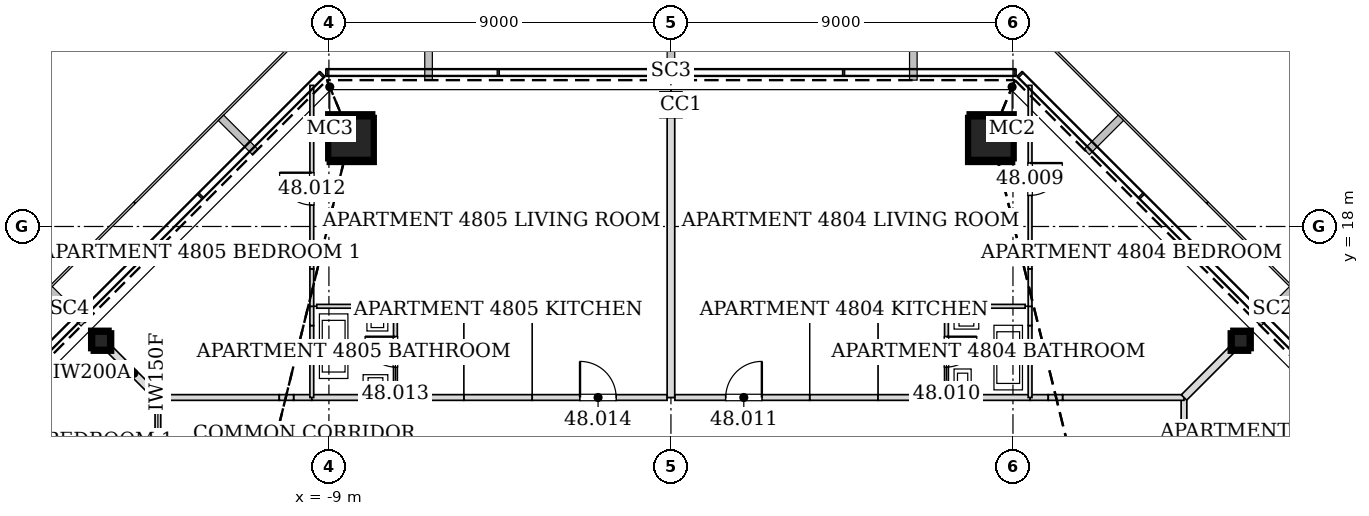
"""IFC4 building model, lengths in metres.
Left out: names, types, materials, properties, quantities, classifications, styles, units other than length and angle.
Written with IfcOpenShell. Run it as: python <this file> out.ifc"""

import sys

from ifc_helpers import new_model, si_unit, direction, frame, frame_2d, origin, origin_2d, place, context, subcontext, project, spatial, rectangle, hollow_rectangle, extrude, element, fill, save


model = new_model("IFC4")
c1 = context("Model", 3, precision=1e-05, world=origin(), true_north=direction((0.0, 1.0)))
c2 = subcontext(c1, "Body", "Model", "MODEL_VIEW")
j1 = project(units=[si_unit("LENGTHUNIT", "METRE"), si_unit("PLANEANGLEUNIT", "RADIAN")], contexts=[c1])
p1 = place(None, origin())
s1 = spatial("IfcSite", under=j1, at=p1, CompositionType="ELEMENT")
p2 = place(p1, origin())
s2 = spatial("IfcBuilding", under=s1, at=p2, CompositionType="ELEMENT")
p3 = place(p2, frame((0.0, 0.0, 210.8)))
s3 = spatial("IfcBuildingStorey", under=s2, at=p3, CompositionType="ELEMENT", Elevation=210.8)
for number, where, z_axis, x_axis in (
    (1, (8.439, 20.373, 0.0), (-0.012, -0.028, 1.0), (0.924, -0.382, 0.0)),
    (2, (-8.439, 20.373, 0.0), (0.012, -0.028, 1.0), (0.924, 0.382, 0.0)),
):
    element("IfcColumn", number, at=place(p3, frame(where, z_axis=z_axis, x_axis=x_axis)), inside=s3, PredefinedType="COLUMN", context=c2, shape_type="SweptSolid", body=[
        extrude(hollow_rectangle(XDim=1.2, YDim=1.2, WallThickness=0.055, at=origin_2d()), origin(), (0.0, 0.0, 1.0), 3.402),
    ])
for number, where, z_axis, x_axis in (
    (3, (15.027, 15.027, 0.0), (-0.02, -0.02, 1.0), (0.707, -0.707, 0.0)),
    (4, (0.0, 21.251, 0.0), (0.0, -0.028, 1.0), (1.0, 0.0, 0.0)),
    (5, (-15.027, 15.027, 0.0), (0.02, -0.02, 1.0), (0.707, 0.707, 0.0)),
):
    element("IfcColumn", number, at=place(p3, frame(where, z_axis=z_axis, x_axis=x_axis)), inside=s3, PredefinedType="COLUMN", context=c2, shape_type="SweptSolid", body=[
        extrude(hollow_rectangle(XDim=0.5, YDim=0.5, WallThickness=0.025, at=origin_2d()), origin(), (0.0, 0.0, 1.0), 3.401),
    ])
for number, where, z_axis, x_axis in (
    (6, (13.5, 10.305, 0.0), (0.0, 0.0, 1.0), (0.0, 1.0, 0.0)),
    (7, (13.5, 13.5, 0.0), (0.0, 0.0, 1.0), (-1.0, 0.0, 0.0)),
):
    element("IfcWall", number, at=place(p3, frame(where, z_axis=z_axis, x_axis=x_axis)), inside=s3, PredefinedType="PARTITIONING", context=c2, shape_type="SweptSolid", body=[
        extrude(rectangle(XDim=3.195, YDim=0.15, at=frame_2d((1.597, 0.0))), origin(), (0.0, 0.0, 1.0), 2.512),
    ])
p4 = place(p3, frame((9.929, 13.5, 0.0), z_axis=(0.0, 0.0, 1.0), x_axis=(-1.0, 0.0, 0.0)))
e8 = element("IfcWall", 8, at=p4, inside=s3, PredefinedType="PARTITIONING", context=c2, shape_type="SweptSolid", body=[
    extrude(rectangle(XDim=0.48, YDim=0.15, at=frame_2d((0.24, 0.0))), origin(), (0.0, 0.0, 1.0), 2.591),
])
p5 = place(p3, frame((10.305, 13.5, 0.0), z_axis=(0.0, 0.0, 1.0), x_axis=(-1.0, 0.0, 0.0)))
e9 = element("IfcWall", 9, at=p5, inside=s3, PredefinedType="PARTITIONING", context=c2, shape_type="SweptSolid", body=[
    extrude(rectangle(XDim=0.376, YDim=0.15, at=frame_2d((0.188, 0.0))), origin(), (0.0, 0.0, 1.0), 2.268),
])
p6 = place(p3, frame((9.451, 13.5, 0.0), z_axis=(0.0, 0.0, 1.0), x_axis=(-1.0, 0.0, 0.0)))
e10 = element("IfcWall", 10, at=p6, inside=s3, PredefinedType="PARTITIONING", context=c2, shape_type="SweptSolid", body=[
    extrude(rectangle(XDim=2.202, YDim=0.15, at=frame_2d((1.101, 0.0))), origin(), (0.0, 0.0, 1.0), 2.591),
])
p7 = place(p3, frame((5.451, 13.5, 0.0), z_axis=(0.0, 0.0, 1.0), x_axis=(-1.0, 0.0, 0.0)))
e11 = element("IfcWall", 11, at=p7, inside=s3, PredefinedType="PARTITIONING", context=c2, shape_type="SweptSolid", body=[
    extrude(rectangle(XDim=1.802, YDim=0.15, at=frame_2d((0.901, 0.0))), origin(), (0.0, 0.0, 1.0), 2.591),
])
p8 = place(p3, frame((3.651, 13.5, 0.0), z_axis=(0.0, 0.0, 1.0), x_axis=(-1.0, 0.0, 0.0)))
e12 = element("IfcWall", 12, at=p8, inside=s3, PredefinedType="PARTITIONING", context=c2, shape_type="SweptSolid", body=[
    extrude(rectangle(XDim=3.549, YDim=0.15, at=frame_2d((1.774, 0.0))), origin(), (0.0, 0.0, 1.0), 2.591),
])
p9 = place(p8, frame((1.259, 0.0, 0.0)))
e13 = element("IfcOpeningElement", 13, at=p9, cuts=e12, PredefinedType="OPENING", context=c2, shape_type="SweptSolid", body=[
    extrude(rectangle(XDim=0.95, YDim=2.1, at=frame_2d((0.475, 1.05))), frame((0.0, 0.085, 0.0), z_axis=(0.0, -1.0, 0.0), x_axis=(1.0, 0.0, 0.0)), (0.0, 0.0, 1.0), 0.17),
])
p10 = place(p3, frame((7.251, 13.5, 0.0), z_axis=(0.0, 0.0, 1.0), x_axis=(-1.0, 0.0, 0.0)))
e14 = element("IfcWall", 14, at=p10, inside=s3, PredefinedType="PARTITIONING", context=c2, shape_type="SweptSolid", body=[
    extrude(rectangle(XDim=1.802, YDim=0.15, at=frame_2d((0.901, 0.0))), origin(), (0.0, 0.0, 1.0), 2.591),
])
p11 = place(p3, frame((-9.449, 13.5, 0.0), z_axis=(0.0, 0.0, 1.0), x_axis=(-1.0, 0.0, 0.0)))
e15 = element("IfcWall", 15, at=p11, inside=s3, PredefinedType="PARTITIONING", context=c2, shape_type="SweptSolid", body=[
    extrude(rectangle(XDim=0.48, YDim=0.15, at=frame_2d((0.24, 0.0))), origin(), (0.0, 0.0, 1.0), 2.591),
])
p12 = place(p3, frame((-10.305, 13.5, 0.0), z_axis=(0.0, 0.0, 1.0), x_axis=(-1.0, 0.0, 0.0)))
e16 = element("IfcWall", 16, at=p12, inside=s3, PredefinedType="PARTITIONING", context=c2, shape_type="SweptSolid", body=[
    extrude(rectangle(XDim=3.195, YDim=0.15, at=frame_2d((1.597, 0.0))), origin(), (0.0, 0.0, 1.0), 2.512),
])
p13 = place(p3, frame((-9.929, 13.5, 0.0), z_axis=(0.0, 0.0, 1.0), x_axis=(-1.0, 0.0, 0.0)))
e17 = element("IfcWall", 17, at=p13, inside=s3, PredefinedType="PARTITIONING", context=c2, shape_type="SweptSolid", body=[
    extrude(rectangle(XDim=0.376, YDim=0.15, at=frame_2d((0.188, 0.0))), origin(), (0.0, 0.0, 1.0), 2.268),
])
p14 = place(p3, frame((-7.249, 13.5, 0.0), z_axis=(0.0, 0.0, 1.0), x_axis=(-1.0, 0.0, 0.0)))
e18 = element("IfcWall", 18, at=p14, inside=s3, PredefinedType="PARTITIONING", context=c2, shape_type="SweptSolid", body=[
    extrude(rectangle(XDim=2.202, YDim=0.15, at=frame_2d((1.101, 0.0))), origin(), (0.0, 0.0, 1.0), 2.591),
])
for number, where, z_axis, x_axis in (
    (19, (-3.649, 13.5, 0.0), (0.0, 0.0, 1.0), (-1.0, 0.0, 0.0)),
    (20, (-5.449, 13.5, 0.0), (0.0, 0.0, 1.0), (-1.0, 0.0, 0.0)),
):
    element("IfcWall", number, at=place(p3, frame(where, z_axis=z_axis, x_axis=x_axis)), inside=s3, PredefinedType="PARTITIONING", context=c2, shape_type="SweptSolid", body=[
        extrude(rectangle(XDim=1.802, YDim=0.15, at=frame_2d((0.901, 0.0))), origin(), (0.0, 0.0, 1.0), 2.591),
    ])
p15 = place(p3, frame((-0.102, 13.5, 0.0), z_axis=(0.0, 0.0, 1.0), x_axis=(-1.0, 0.0, 0.0)))
e21 = element("IfcWall", 21, at=p15, inside=s3, PredefinedType="PARTITIONING", context=c2, shape_type="SweptSolid", body=[
    extrude(rectangle(XDim=3.549, YDim=0.15, at=frame_2d((1.774, 0.0))), origin(), (0.0, 0.0, 1.0), 2.591),
])
p16 = place(p15, frame((1.34, 0.0, 0.0)))
e22 = element("IfcOpeningElement", 22, at=p16, cuts=e21, PredefinedType="OPENING", context=c2, shape_type="SweptSolid", body=[
    extrude(rectangle(XDim=0.95, YDim=2.1, at=frame_2d((0.475, 1.05))), frame((0.0, 0.085, 0.0), z_axis=(0.0, -1.0, 0.0), x_axis=(1.0, 0.0, 0.0)), (0.0, 0.0, 1.0), 0.17),
])
p17 = place(p3, frame((-13.5, 13.5, 0.0), z_axis=(0.0, 0.0, 1.0), x_axis=(0.0, -1.0, 0.0)))
e23 = element("IfcWall", 23, at=p17, inside=s3, PredefinedType="PARTITIONING", context=c2, shape_type="SweptSolid", body=[
    extrude(rectangle(XDim=1.851, YDim=0.15, at=frame_2d((0.926, 0.0))), origin(), (0.0, 0.0, 1.0), 2.512),
])
p18 = place(p3, frame((14.769, 14.769, 0.0), z_axis=(0.0, 0.0, 1.0), x_axis=(-0.707106781187, -0.707106781187, 0.0)))
e24 = element("IfcWall", 24, at=p18, inside=s3, PredefinedType="PARTITIONING", context=c2, shape_type="SweptSolid", body=[
    extrude(rectangle(XDim=1.794, YDim=0.2, at=frame_2d((0.897, 0.0))), origin(), (0.0, 0.0, 1.0), 2.512),
])
p19 = place(p3, frame((9.45, 15.393, 0.0), z_axis=(0.0, 0.0, 1.0), x_axis=(0.0, -1.0, 0.0)))
e25 = element("IfcWall", 25, at=p19, inside=s3, PredefinedType="PARTITIONING", context=c2, shape_type="SweptSolid", body=[
    extrude(rectangle(XDim=1.893, YDim=0.1, at=frame_2d((0.947, 0.0))), origin(), (0.0, 0.0, 1.0), 3.2),
])
p20 = place(p3, frame((9.45, 15.901, 0.0), z_axis=(0.0, 0.0, 1.0), x_axis=(0.0, -1.0, 0.0)))
e26 = element("IfcWall", 26, at=p20, inside=s3, PredefinedType="PARTITIONING", context=c2, shape_type="SweptSolid", body=[
    extrude(rectangle(XDim=0.508, YDim=0.1, at=frame_2d((0.254, 0.0))), origin(), (0.0, 0.0, 1.0), 2.268),
])
p21 = place(p3, frame((9.45, 21.714, 0.0), z_axis=(0.0, 0.0, 1.0), x_axis=(0.0, -1.0, 0.0)))
e27 = element("IfcWall", 27, at=p21, inside=s3, PredefinedType="PARTITIONING", context=c2, shape_type="SweptSolid", body=[
    extrude(rectangle(XDim=4.833, YDim=0.1, at=frame_2d((2.416, 0.0))), origin(), (0.0, 0.0, 1.0), 2.664),
])
p22 = place(p21, frame((2.045, 0.0, 0.0)))
e28 = element("IfcOpeningElement", 28, at=p22, cuts=e27, PredefinedType="OPENING", context=c2, shape_type="SweptSolid", body=[
    extrude(rectangle(XDim=0.85, YDim=2.1, at=frame_2d((0.425, 1.05))), frame((0.0, 0.06, 0.0), z_axis=(0.0, -1.0, 0.0), x_axis=(1.0, 0.0, 0.0)), (0.0, 0.0, 1.0), 0.12),
])
p23 = place(p3, frame((9.45, 16.881, 0.0), z_axis=(0.0, 0.0, 1.0), x_axis=(0.0, -1.0, 0.0)))
e29 = element("IfcWall", 29, at=p23, inside=s3, PredefinedType="PARTITIONING", context=c2, shape_type="SweptSolid", body=[
    extrude(rectangle(XDim=0.982, YDim=0.1, at=frame_2d((0.491, 0.0))), origin(), (0.0, 0.0, 1.0), 2.268),
])
p24 = place(p3, frame((9.322, 15.9, 0.0), z_axis=(0.0, 0.0, 1.0), x_axis=(-1.0, 0.0, 0.0)))
e30 = element("IfcWall", 30, at=p24, inside=s3, PredefinedType="PARTITIONING", context=c2, shape_type="SweptSolid", body=[
    extrude(rectangle(XDim=2.072, YDim=0.1, at=frame_2d((1.036, 0.0))), origin(), (0.0, 0.0, 1.0), 2.664),
])
p25 = place(p3, frame((7.25, 15.9, 0.0), z_axis=(0.0, 0.0, 1.0), x_axis=(0.0, -1.0, 0.0)))
e31 = element("IfcWall", 31, at=p25, inside=s3, PredefinedType="PARTITIONING", context=c2, shape_type="SweptSolid", body=[
    extrude(rectangle(XDim=2.4, YDim=0.1, at=frame_2d((1.2, 0.0))), origin(), (0.0, 0.0, 1.0), 2.664),
])
p26 = place(p25, frame((0.8, 0.0, 0.0)))
e32 = element("IfcOpeningElement", 32, at=p26, cuts=e31, PredefinedType="OPENING", context=c2, shape_type="SweptSolid", body=[
    extrude(rectangle(XDim=0.8, YDim=2.1, at=frame_2d((0.4, 1.05))), frame((0.0, 0.06, 0.0), z_axis=(0.0, -1.0, 0.0), x_axis=(1.0, 0.0, 0.0)), (0.0, 0.0, 1.0), 0.12),
])
p27 = place(p3, frame((0.0, 20.886, 0.0), z_axis=(0.0, 0.0, 1.0), x_axis=(0.0, -1.0, 0.0)))
e33 = element("IfcWall", 33, at=p27, inside=s3, PredefinedType="PARTITIONING", context=c2, shape_type="SweptSolid", body=[
    extrude(rectangle(XDim=7.386, YDim=0.2, at=frame_2d((3.693, 0.0))), origin(), (0.0, 0.0, 1.0), 2.253),
])
p28 = place(p3, frame((-9.45, 13.5, 0.0), z_axis=(0.0, 0.0, 1.0), x_axis=(0.0, 1.0, 0.0)))
e34 = element("IfcWall", 34, at=p28, inside=s3, PredefinedType="PARTITIONING", context=c2, shape_type="SweptSolid", body=[
    extrude(rectangle(XDim=1.893, YDim=0.1, at=frame_2d((0.947, 0.0))), origin(), (0.0, 0.0, 1.0), 3.2),
])
p29 = place(p3, frame((-9.45, 15.393, 0.0), z_axis=(0.0, 0.0, 1.0), x_axis=(0.0, 1.0, 0.0)))
e35 = element("IfcWall", 35, at=p29, inside=s3, PredefinedType="PARTITIONING", context=c2, shape_type="SweptSolid", body=[
    extrude(rectangle(XDim=0.508, YDim=0.1, at=frame_2d((0.254, 0.0))), origin(), (0.0, 0.0, 1.0), 2.268),
])
p30 = place(p3, frame((-9.45, 16.881, 0.0), z_axis=(0.0, 0.0, 1.0), x_axis=(0.0, 1.0, 0.0)))
e36 = element("IfcWall", 36, at=p30, inside=s3, PredefinedType="PARTITIONING", context=c2, shape_type="SweptSolid", body=[
    extrude(rectangle(XDim=4.833, YDim=0.1, at=frame_2d((2.416, 0.0))), origin(), (0.0, 0.0, 1.0), 2.664),
])
p31 = place(p30, frame((1.684, 0.0, 0.0)))
e37 = element("IfcOpeningElement", 37, at=p31, cuts=e36, PredefinedType="OPENING", context=c2, shape_type="SweptSolid", body=[
    extrude(rectangle(XDim=0.85, YDim=2.1, at=frame_2d((0.425, 1.05))), frame((0.0, 0.06, 0.0), z_axis=(0.0, -1.0, 0.0), x_axis=(1.0, 0.0, 0.0)), (0.0, 0.0, 1.0), 0.12),
])
p32 = place(p3, frame((-9.45, 15.899, 0.0), z_axis=(0.0, 0.0, 1.0), x_axis=(0.0, 1.0, 0.0)))
e38 = element("IfcWall", 38, at=p32, inside=s3, PredefinedType="PARTITIONING", context=c2, shape_type="SweptSolid", body=[
    extrude(rectangle(XDim=0.982, YDim=0.1, at=frame_2d((0.491, 0.0))), origin(), (0.0, 0.0, 1.0), 2.268),
])
p33 = place(p3, frame((-14.769, 14.769, 0.0), z_axis=(0.0, 0.0, 1.0), x_axis=(0.707106781187, -0.707106781187, 0.0)))
e39 = element("IfcWall", 39, at=p33, inside=s3, PredefinedType="PARTITIONING", context=c2, shape_type="SweptSolid", body=[
    extrude(rectangle(XDim=1.794, YDim=0.2, at=frame_2d((0.897, 0.0))), origin(), (0.0, 0.0, 1.0), 2.512),
])
p34 = place(p3, frame((-7.25, 13.5, 0.0), z_axis=(0.0, 0.0, 1.0), x_axis=(0.0, 1.0, 0.0)))
e40 = element("IfcWall", 40, at=p34, inside=s3, PredefinedType="PARTITIONING", context=c2, shape_type="SweptSolid", body=[
    extrude(rectangle(XDim=2.4, YDim=0.1, at=frame_2d((1.2, 0.0))), origin(), (0.0, 0.0, 1.0), 2.664),
])
p35 = place(p34, frame((0.8, 0.0, 0.0)))
e41 = element("IfcOpeningElement", 41, at=p35, cuts=e40, PredefinedType="OPENING", context=c2, shape_type="SweptSolid", body=[
    extrude(rectangle(XDim=0.8, YDim=2.1, at=frame_2d((0.4, 1.05))), frame((0.0, 0.06, 0.0), z_axis=(0.0, -1.0, 0.0), x_axis=(1.0, 0.0, 0.0)), (0.0, 0.0, 1.0), 0.12),
])
p36 = place(p3, frame((-7.25, 15.9, 0.0), z_axis=(0.0, 0.0, 1.0), x_axis=(-1.0, 0.0, 0.0)))
e42 = element("IfcWall", 42, at=p36, inside=s3, PredefinedType="PARTITIONING", context=c2, shape_type="SweptSolid", body=[
    extrude(rectangle(XDim=2.072, YDim=0.1, at=frame_2d((1.036, 0.0))), origin(), (0.0, 0.0, 1.0), 2.664),
])
p37 = place(p22, origin())
e43 = element("IfcDoor", 43, at=p37, inside=s3, OperationType="SINGLE_SWING_LEFT", PredefinedType="DOOR", context=c2, shape_type="SweptSolid", body=[
    extrude(rectangle(XDim=0.85, YDim=2.1, at=frame_2d((0.425, 1.05))), frame((0.0, 0.025, 0.0), z_axis=(0.0, -1.0, 0.0), x_axis=(1.0, 0.0, 0.0)), (0.0, 0.0, 1.0), 0.05),
])
fill(e28, e43)
p38 = place(p26, origin())
e44 = element("IfcDoor", 44, at=p38, inside=s3, OperationType="SINGLE_SWING_LEFT", PredefinedType="DOOR", context=c2, shape_type="SweptSolid", body=[
    extrude(rectangle(XDim=0.8, YDim=2.1, at=frame_2d((0.4, 1.05))), frame((0.0, 0.025, 0.0), z_axis=(0.0, -1.0, 0.0), x_axis=(1.0, 0.0, 0.0)), (0.0, 0.0, 1.0), 0.05),
])
fill(e32, e44)
p39 = place(p9, frame((0.95, 0.0, 0.0), z_axis=(0.0, 0.0, 1.0), x_axis=(-1.0, 0.0, 0.0)))
e45 = element("IfcDoor", 45, at=p39, inside=s3, OperationType="SINGLE_SWING_RIGHT", PredefinedType="DOOR", context=c2, shape_type="SweptSolid", body=[
    extrude(rectangle(XDim=0.95, YDim=2.1, at=frame_2d((0.475, 1.05))), frame((0.0, 0.025, 0.0), z_axis=(0.0, -1.0, 0.0), x_axis=(1.0, 0.0, 0.0)), (0.0, 0.0, 1.0), 0.05),
])
fill(e13, e45)
p40 = place(p31, origin())
e46 = element("IfcDoor", 46, at=p40, inside=s3, OperationType="SINGLE_SWING_RIGHT", PredefinedType="DOOR", context=c2, shape_type="SweptSolid", body=[
    extrude(rectangle(XDim=0.85, YDim=2.1, at=frame_2d((0.425, 1.05))), frame((0.0, 0.025, 0.0), z_axis=(0.0, -1.0, 0.0), x_axis=(1.0, 0.0, 0.0)), (0.0, 0.0, 1.0), 0.05),
])
fill(e37, e46)
p41 = place(p35, origin())
e47 = element("IfcDoor", 47, at=p41, inside=s3, OperationType="SINGLE_SWING_RIGHT", PredefinedType="DOOR", context=c2, shape_type="SweptSolid", body=[
    extrude(rectangle(XDim=0.8, YDim=2.1, at=frame_2d((0.4, 1.05))), frame((0.0, 0.025, 0.0), z_axis=(0.0, -1.0, 0.0), x_axis=(1.0, 0.0, 0.0)), (0.0, 0.0, 1.0), 0.05),
])
fill(e41, e47)
p42 = place(p16, frame((0.95, 0.0, 0.0), z_axis=(0.0, 0.0, 1.0), x_axis=(-1.0, 0.0, 0.0)))
e48 = element("IfcDoor", 48, at=p42, inside=s3, OperationType="SINGLE_SWING_LEFT", PredefinedType="DOOR", context=c2, shape_type="SweptSolid", body=[
    extrude(rectangle(XDim=0.95, YDim=2.1, at=frame_2d((0.475, 1.05))), frame((0.0, 0.025, 0.0), z_axis=(0.0, -1.0, 0.0), x_axis=(1.0, 0.0, 0.0)), (0.0, 0.0, 1.0), 0.05),
])
fill(e22, e48)
save(model, sys.argv[1])
